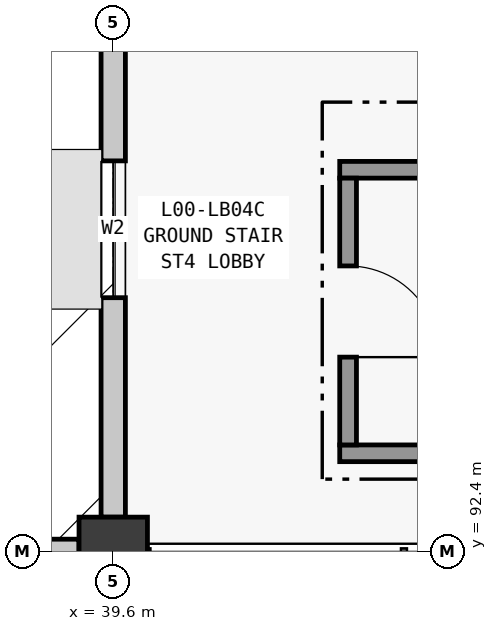
"""IFC4 building model, lengths in metres.
Left out: names, types, materials, properties, quantities, classifications, styles, units other than length and angle.
Written with IfcOpenShell. Run it as: python <this file> out.ifc"""

import sys

from ifc_helpers import new_model, si_unit, direction, frame, frame_2d, origin, origin_2d, place, context, subcontext, project, spatial, rectangle, extrude, element, fill, save


model = new_model("IFC4")
c1 = context("Model", 3, precision=1e-05, world=origin(), true_north=direction((0.0, 1.0)))
c2 = subcontext(c1, "Body", "Model", "MODEL_VIEW")
j1 = project(units=[si_unit("LENGTHUNIT", "METRE"), si_unit("PLANEANGLEUNIT", "RADIAN")], contexts=[c1])
p1 = place(None, origin())
s1 = spatial("IfcSite", under=j1, at=p1, CompositionType="ELEMENT")
p2 = place(p1, origin())
s2 = spatial("IfcBuilding", under=s1, at=p2, CompositionType="ELEMENT")
p3 = place(p2, origin())
s3 = spatial("IfcBuildingStorey", under=s2, at=p3, CompositionType="ELEMENT", Elevation=0.0)
p4 = place(p3, frame((39.6, 92.4, 0.0), z_axis=(0.0, 0.0, 1.0), x_axis=(1.0, 0.0, 0.0)))
e1 = element("IfcColumn", 1, at=p4, inside=s3, PredefinedType="COLUMN", context=c2, shape_type="SweptSolid", body=[
    extrude(rectangle(XDim=0.9, YDim=0.9, at=origin_2d()), origin(), (0.0, 0.0, 1.0), 4.8),
])
p5 = place(p3, frame((39.15, 92.4, 0.0), z_axis=(0.0, 0.0, 1.0), x_axis=(-1.0, 0.0, 0.0)))
e2 = element("IfcWall", 2, at=p5, inside=s3, PredefinedType="STANDARD", context=c2, shape_type="SweptSolid", body=[
    extrude(rectangle(XDim=13.5, YDim=0.32, at=frame_2d((6.75, 0.0))), origin(), (0.0, 0.0, 1.0), 3.606),
])
p6 = place(p5, frame((5.75, 0.0, 0.0)))
e3 = element("IfcOpeningElement", 3, at=p6, cuts=e2, PredefinedType="OPENING", context=c2, shape_type="SweptSolid", body=[
    extrude(rectangle(XDim=2.0, YDim=2.4, at=frame_2d((1.0, 1.2))), frame((0.0, 0.175, 0.0), z_axis=(0.0, -1.0, 0.0), x_axis=(1.0, 0.0, 0.0)), (0.0, 0.0, 1.0), 0.35),
])
p7 = place(p5, frame((2.18, 0.0, 0.95)))
e4 = element("IfcOpeningElement", 4, at=p7, cuts=e2, PredefinedType="OPENING", context=c2, shape_type="SweptSolid", body=[
    extrude(rectangle(XDim=3.2, YDim=1.6, at=frame_2d((1.6, 0.8))), frame((0.0, 0.175, 0.0), z_axis=(0.0, -1.0, 0.0), x_axis=(1.0, 0.0, 0.0)), (0.0, 0.0, 1.0), 0.35),
])
p8 = place(p5, frame((8.42, 0.0, 0.95)))
e5 = element("IfcOpeningElement", 5, at=p8, cuts=e2, PredefinedType="OPENING", context=c2, shape_type="SweptSolid", body=[
    extrude(rectangle(XDim=2.6, YDim=1.65, at=frame_2d((1.3, 0.825))), frame((0.0, 0.175, 0.0), z_axis=(0.0, -1.0, 0.0), x_axis=(1.0, 0.0, 0.0)), (0.0, 0.0, 1.0), 0.35),
])
p9 = place(p3, frame((39.6, 100.425, 0.0), z_axis=(0.0, 0.0, 1.0), x_axis=(0.0, -1.0, 0.0)))
e6 = element("IfcWall", 6, at=p9, inside=s3, PredefinedType="STANDARD", context=c2, shape_type="SweptSolid", body=[
    extrude(rectangle(XDim=7.575, YDim=0.32, at=frame_2d((3.788, 0.0))), origin(), (0.0, 0.0, 1.0), 3.976),
])
p10 = place(p9, frame((2.888, 0.0, 0.9)))
e7 = element("IfcOpeningElement", 7, at=p10, cuts=e6, PredefinedType="OPENING", context=c2, shape_type="SweptSolid", body=[
    extrude(rectangle(XDim=1.8, YDim=1.8, at=frame_2d((0.9, 0.9))), frame((0.0, 0.175, 0.0), z_axis=(0.0, -1.0, 0.0), x_axis=(1.0, 0.0, 0.0)), (0.0, 0.0, 1.0), 0.35),
])
for number, where, z_axis, x_axis in (
    (8, (42.58, 93.69, 0.0), (0.0, 0.0, 1.0), (1.0, 0.0, 0.0)),
    (9, (51.3, 97.42, 0.0), (0.0, 0.0, 1.0), (-1.0, 0.0, 0.0)),
):
    element("IfcWall", number, at=place(p3, frame(where, z_axis=z_axis, x_axis=x_axis)), inside=s3, PredefinedType="SOLIDWALL", context=c2, shape_type="SweptSolid", body=[
        extrude(rectangle(XDim=8.72, YDim=0.22, at=frame_2d((4.36, 0.0))), origin(), (0.0, 0.0, 1.0), 4.52),
    ])
p11 = place(p3, frame((42.69, 97.31, 0.0), z_axis=(0.0, 0.0, 1.0), x_axis=(0.0, -1.0, 0.0)))
e10 = element("IfcWall", 10, at=p11, inside=s3, PredefinedType="SOLIDWALL", context=c2, shape_type="SweptSolid", body=[
    extrude(rectangle(XDim=3.51, YDim=0.22, at=frame_2d((1.755, 0.0))), origin(), (0.0, 0.0, 1.0), 4.52),
])
p12 = place(p11, frame((1.155, 0.0, 0.0)))
e11 = element("IfcOpeningElement", 11, at=p12, cuts=e10, PredefinedType="OPENING", context=c2, shape_type="SweptSolid", body=[
    extrude(rectangle(XDim=1.2, YDim=2.2, at=frame_2d((0.6, 1.1))), frame((0.0, 0.125, 0.0), z_axis=(0.0, -1.0, 0.0), x_axis=(1.0, 0.0, 0.0)), (0.0, 0.0, 1.0), 0.25),
])
p13 = place(p10, origin())
e12 = element("IfcWindow", 12, at=p13, inside=s3, PartitioningType="SINGLE_PANEL", PredefinedType="WINDOW", context=c2, shape_type="SweptSolid", body=[
    extrude(rectangle(XDim=1.8, YDim=1.8, at=frame_2d((0.9, 0.9))), frame((0.0, 0.03, 0.0), z_axis=(0.0, -1.0, 0.0), x_axis=(1.0, 0.0, 0.0)), (0.0, 0.0, 1.0), 0.06),
])
fill(e7, e12)
p14 = place(p12, origin())
e13 = element("IfcDoor", 13, at=p14, inside=s3, OperationType="SINGLE_SWING_RIGHT", PredefinedType="DOOR", context=c2, shape_type="SweptSolid", body=[
    extrude(rectangle(XDim=1.2, YDim=2.2, at=frame_2d((0.6, 1.1))), frame((0.0, 0.025, 0.0), z_axis=(0.0, -1.0, 0.0), x_axis=(1.0, 0.0, 0.0)), (0.0, 0.0, 1.0), 0.05),
])
fill(e11, e13)
save(model, sys.argv[1])
